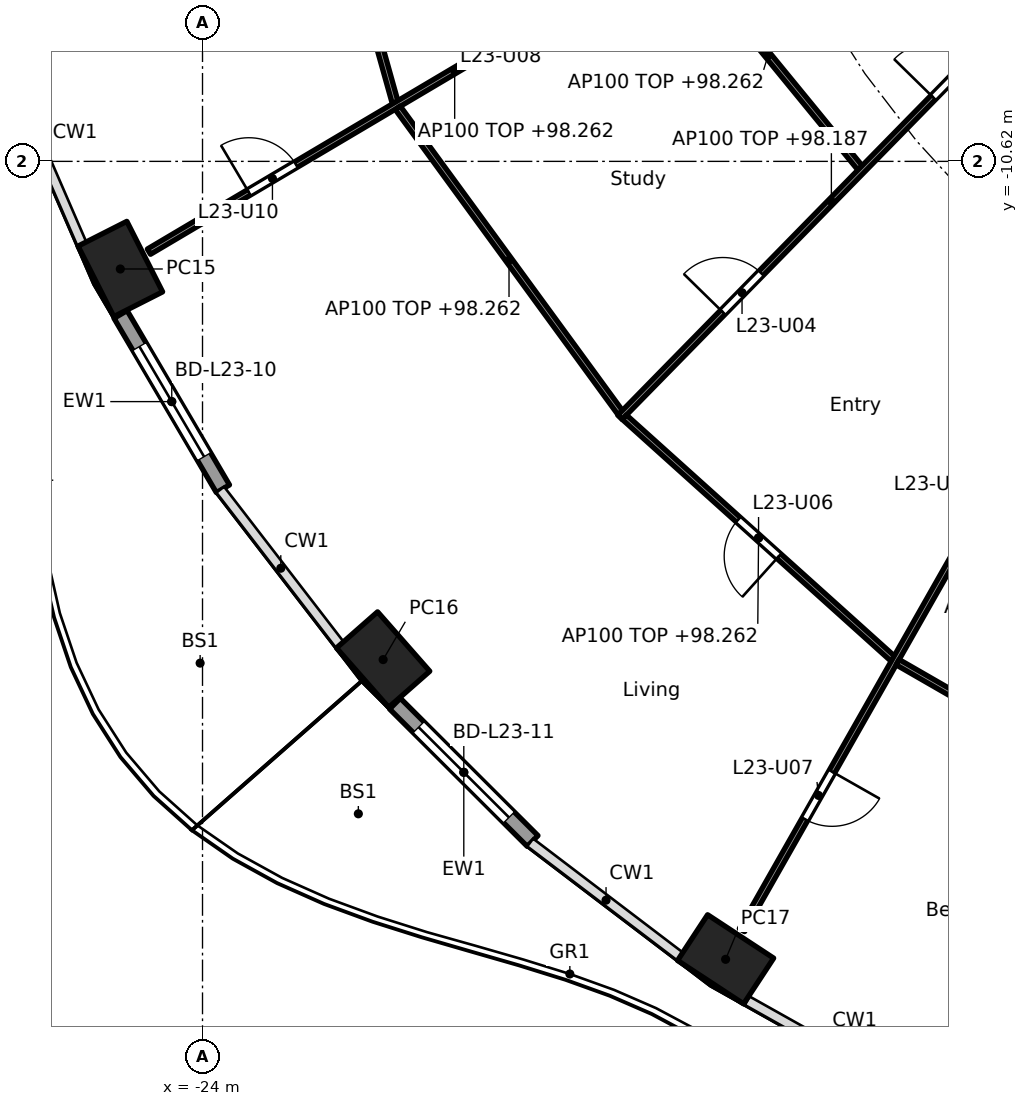
"""IFC4 building model, lengths in metres.
Left out: names, types, materials, properties, quantities, classifications, styles, units other than length and angle.
Written with IfcOpenShell. Run it as: python <this file> out.ifc"""

import sys

from ifc_helpers import new_model, si_unit, direction, frame, frame_2d, origin, origin_2d, place, context, subcontext, project, spatial, rectangle, hollow_rectangle, extrude, element, fill, save


model = new_model("IFC4")
c1 = context("Model", 3, precision=1e-05, world=origin(), true_north=direction((0.0, 1.0)))
c2 = subcontext(c1, "Body", "Model", "MODEL_VIEW")
j1 = project(units=[si_unit("LENGTHUNIT", "METRE"), si_unit("PLANEANGLEUNIT", "RADIAN")], contexts=[c1])
p1 = place(None, origin())
s1 = spatial("IfcSite", under=j1, at=p1, CompositionType="ELEMENT")
p2 = place(p1, origin())
s2 = spatial("IfcBuilding", under=s1, at=p2, CompositionType="ELEMENT")
p3 = place(p2, frame((0.0, 0.0, 95.5)))
s3 = spatial("IfcBuildingStorey", under=s2, at=p3, CompositionType="ELEMENT", Elevation=95.5)
for number, where, z_axis, x_axis in (
    (1, (-25.352, -12.39, 0.0), (0.0, 0.0, 1.0), (0.452, -0.892, 0.0)),
    (2, (-21.03, -18.813, 0.0), (0.0, 0.0, 1.0), (0.66, -0.751, 0.0)),
    (3, (-15.397, -23.742, 0.0), (0.0, 0.0, 1.0), (0.836, -0.549, 0.0)),
):
    element("IfcColumn", number, at=place(p3, frame(where, z_axis=z_axis, x_axis=x_axis)), inside=s3, PredefinedType="COLUMN", context=c2, shape_type="SweptSolid", body=[
        extrude(hollow_rectangle(XDim=1.3, YDim=0.9, WallThickness=0.045, at=origin_2d()), origin(), (0.0, 0.0, 1.0), 3.7),
    ])
p4 = place(p3, frame((-23.664, -16.004, 0.0), z_axis=(0.0, 0.0, 1.0), x_axis=(-0.506352525095, 0.86232657406, 0.0)))
e4 = element("IfcWall", 4, at=p4, inside=s3, PredefinedType="SOLIDWALL", context=c2, shape_type="SweptSolid", body=[
    extrude(rectangle(XDim=3.325, YDim=0.25, at=frame_2d((1.663, 0.0))), origin(), (0.0, 0.0, 1.0), 3.44),
])
p5 = place(p4, frame((0.612, 0.0, 0.0)))
e5 = element("IfcOpeningElement", 5, at=p5, cuts=e4, PredefinedType="OPENING", context=c2, shape_type="SweptSolid", body=[
    extrude(rectangle(XDim=2.1, YDim=2.4, at=frame_2d((1.05, 1.2))), frame((0.0, 0.135, 0.0), z_axis=(0.0, -1.0, 0.0), x_axis=(1.0, 0.0, 0.0)), (0.0, 0.0, 1.0), 0.27),
])
p6 = place(p3, frame((-18.571, -21.796, 0.0), z_axis=(0.0, 0.0, 1.0), x_axis=(-0.707831646613, 0.706381171927, 0.0)))
e6 = element("IfcWall", 6, at=p6, inside=s3, PredefinedType="SOLIDWALL", context=c2, shape_type="SweptSolid", body=[
    extrude(rectangle(XDim=3.198, YDim=0.25, at=frame_2d((1.599, 0.0))), origin(), (0.0, 0.0, 1.0), 3.44),
])
p7 = place(p6, frame((0.549, 0.0, 0.0)))
e7 = element("IfcOpeningElement", 7, at=p7, cuts=e6, PredefinedType="OPENING", context=c2, shape_type="SweptSolid", body=[
    extrude(rectangle(XDim=2.1, YDim=2.4, at=frame_2d((1.05, 1.2))), frame((0.0, 0.135, 0.0), z_axis=(0.0, -1.0, 0.0), x_axis=(1.0, 0.0, 0.0)), (0.0, 0.0, 1.0), 0.27),
])
p8 = place(p3, frame((-12.635, -5.134, 0.0), z_axis=(0.0, 0.0, 1.0), x_axis=(0.707106781187, -0.707106781187, 0.0)))
e8 = element("IfcWall", 8, at=p8, inside=s3, PredefinedType="PARTITIONING", context=c2, shape_type="SweptSolid", body=[
    extrude(rectangle(XDim=10.609, YDim=0.2, at=frame_2d((5.305, 0.0))), origin(), (0.0, 0.0, 1.0), 3.44),
])
p9 = place(p8, frame((4.804, 0.0, 0.0)))
e9 = element("IfcOpeningElement", 9, at=p9, cuts=e8, PredefinedType="OPENING", context=c2, shape_type="SweptSolid", body=[
    extrude(rectangle(XDim=1.0, YDim=2.1, at=frame_2d((0.5, 1.05))), frame((0.0, 0.11, 0.0), z_axis=(0.0, -1.0, 0.0), x_axis=(1.0, 0.0, 0.0)), (0.0, 0.0, 1.0), 0.22),
])
p10 = place(p3, frame((-22.463, -3.832, 0.0), z_axis=(0.0, 0.0, 1.0), x_axis=(0.269797759333, -0.962917010473, 0.0)))
e10 = element("IfcWall", 10, at=p10, inside=s3, PredefinedType="PARTITIONING", context=c2, shape_type="SweptSolid", body=[
    extrude(rectangle(XDim=6.043, YDim=0.1, at=frame_2d((3.021, 0.0))), origin(), (0.0, 0.0, 1.0), 2.762),
])
p11 = place(p3, frame((-14.825, -6.148, 0.0), z_axis=(0.0, 0.0, 1.0), x_axis=(-0.860400431487, -0.509618580408, 0.0)))
e11 = element("IfcWall", 11, at=p11, inside=s3, PredefinedType="PARTITIONING", context=c2, shape_type="SweptSolid", body=[
    extrude(rectangle(XDim=11.688, YDim=0.1, at=frame_2d((5.844, 0.0))), origin(), (0.0, 0.0, 1.0), 2.762),
])
p12 = place(p11, frame((3.858, 0.0, 0.0)))
e12 = element("IfcOpeningElement", 12, at=p12, cuts=e11, PredefinedType="OPENING", context=c2, shape_type="SweptSolid", body=[
    extrude(rectangle(XDim=0.9, YDim=2.1, at=frame_2d((0.45, 1.05))), frame((0.0, 0.06, 0.0), z_axis=(0.0, -1.0, 0.0), x_axis=(1.0, 0.0, 0.0)), (0.0, 0.0, 1.0), 0.12),
])
p13 = place(p11, frame((8.877, 0.0, 0.0)))
e13 = element("IfcOpeningElement", 13, at=p13, cuts=e11, PredefinedType="OPENING", context=c2, shape_type="SweptSolid", body=[
    extrude(rectangle(XDim=0.9, YDim=2.1, at=frame_2d((0.45, 1.05))), frame((0.0, 0.06, 0.0), z_axis=(0.0, -1.0, 0.0), x_axis=(1.0, 0.0, 0.0)), (0.0, 0.0, 1.0), 0.12),
])
p14 = place(p3, frame((-16.214, -7.028, 0.0), z_axis=(0.0, 0.0, 1.0), x_axis=(0.633396341139, -0.773827548639, 0.0)))
e14 = element("IfcWall", 14, at=p14, inside=s3, PredefinedType="PARTITIONING", context=c2, shape_type="SweptSolid", body=[
    extrude(rectangle(XDim=4.779, YDim=0.1, at=frame_2d((2.39, 0.0))), origin(), (0.0, 0.0, 1.0), 2.762),
])
p15 = place(p3, frame((-20.79, -9.739, 0.0), z_axis=(0.0, 0.0, 1.0), x_axis=(0.589611246748, -0.807687178126, 0.0)))
e15 = element("IfcWall", 15, at=p15, inside=s3, PredefinedType="PARTITIONING", context=c2, shape_type="SweptSolid", body=[
    extrude(rectangle(XDim=6.208, YDim=0.1, at=frame_2d((3.104, 0.0))), origin(), (0.0, 0.0, 1.0), 2.762),
])
p16 = place(p3, frame((-10.181, -7.729, 0.0), z_axis=(0.0, 0.0, 1.0), x_axis=(-0.699710752188, -0.714426247609, 0.0)))
e16 = element("IfcWall", 16, at=p16, inside=s3, PredefinedType="PARTITIONING", context=c2, shape_type="SweptSolid", body=[
    extrude(rectangle(XDim=9.938, YDim=0.1, at=frame_2d((4.969, 0.0))), origin(), (0.0, 0.0, 1.0), 2.687),
])
p17 = place(p16, frame((1.675, 0.0, 0.0)))
e17 = element("IfcOpeningElement", 17, at=p17, cuts=e16, PredefinedType="OPENING", context=c2, shape_type="SweptSolid", body=[
    extrude(rectangle(XDim=0.9, YDim=2.1, at=frame_2d((0.45, 1.05))), frame((0.0, 0.06, 0.0), z_axis=(0.0, -1.0, 0.0), x_axis=(1.0, 0.0, 0.0)), (0.0, 0.0, 1.0), 0.12),
])
p18 = place(p16, frame((6.619, 0.0, 0.0)))
e18 = element("IfcOpeningElement", 18, at=p18, cuts=e16, PredefinedType="OPENING", context=c2, shape_type="SweptSolid", body=[
    extrude(rectangle(XDim=0.9, YDim=2.1, at=frame_2d((0.45, 1.05))), frame((0.0, 0.06, 0.0), z_axis=(0.0, -1.0, 0.0), x_axis=(1.0, 0.0, 0.0)), (0.0, 0.0, 1.0), 0.12),
])
p19 = place(p3, frame((-17.063, -14.827, 0.0), z_axis=(0.0, 0.0, 1.0), x_axis=(0.743478142868, -0.668760234373, 0.0)))
e19 = element("IfcWall", 19, at=p19, inside=s3, PredefinedType="PARTITIONING", context=c2, shape_type="SweptSolid", body=[
    extrude(rectangle(XDim=5.937, YDim=0.1, at=frame_2d((2.969, 0.0))), origin(), (0.0, 0.0, 1.0), 2.762),
])
p20 = place(p19, frame((2.519, 0.0, 0.0)))
e20 = element("IfcOpeningElement", 20, at=p20, cuts=e19, PredefinedType="OPENING", context=c2, shape_type="SweptSolid", body=[
    extrude(rectangle(XDim=0.9, YDim=2.1, at=frame_2d((0.45, 1.05))), frame((0.0, 0.06, 0.0), z_axis=(0.0, -1.0, 0.0), x_axis=(1.0, 0.0, 0.0)), (0.0, 0.0, 1.0), 0.12),
])
p21 = place(p3, frame((-7.707, -10.198, 0.0), z_axis=(0.0, 0.0, 1.0), x_axis=(-0.49395524734, -0.869487328042, 0.0)))
e21 = element("IfcWall", 21, at=p21, inside=s3, PredefinedType="PARTITIONING", context=c2, shape_type="SweptSolid", body=[
    extrude(rectangle(XDim=15.025, YDim=0.1, at=frame_2d((7.512, 0.0))), origin(), (0.0, 0.0, 1.0), 2.687),
])
p22 = place(p21, frame((1.684, 0.0, 0.0)))
e22 = element("IfcOpeningElement", 22, at=p22, cuts=e21, PredefinedType="OPENING", context=c2, shape_type="SweptSolid", body=[
    extrude(rectangle(XDim=0.9, YDim=2.1, at=frame_2d((0.45, 1.05))), frame((0.0, 0.06, 0.0), z_axis=(0.0, -1.0, 0.0), x_axis=(1.0, 0.0, 0.0)), (0.0, 0.0, 1.0), 0.12),
])
p23 = place(p21, frame((6.648, 0.0, 0.0)))
e23 = element("IfcOpeningElement", 23, at=p23, cuts=e21, PredefinedType="OPENING", context=c2, shape_type="SweptSolid", body=[
    extrude(rectangle(XDim=0.9, YDim=2.1, at=frame_2d((0.45, 1.05))), frame((0.0, 0.06, 0.0), z_axis=(0.0, -1.0, 0.0), x_axis=(1.0, 0.0, 0.0)), (0.0, 0.0, 1.0), 0.12),
])
p24 = place(p21, frame((12.027, 0.0, 0.0)))
e24 = element("IfcOpeningElement", 24, at=p24, cuts=e21, PredefinedType="OPENING", context=c2, shape_type="SweptSolid", body=[
    extrude(rectangle(XDim=0.9, YDim=2.1, at=frame_2d((0.45, 1.05))), frame((0.0, 0.06, 0.0), z_axis=(0.0, -1.0, 0.0), x_axis=(1.0, 0.0, 0.0)), (0.0, 0.0, 1.0), 0.12),
])
p25 = place(p3, frame((-12.568, -18.856, 0.0), z_axis=(0.0, 0.0, 1.0), x_axis=(0.866533437451, -0.499119025664, 0.0)))
e25 = element("IfcWall", 25, at=p25, inside=s3, PredefinedType="PARTITIONING", context=c2, shape_type="SweptSolid", body=[
    extrude(rectangle(XDim=5.535, YDim=0.1, at=frame_2d((2.768, 0.0))), origin(), (0.0, 0.0, 1.0), 2.762),
])
p26 = place(p25, frame((3.714, 0.0, 0.0)))
e26 = element("IfcOpeningElement", 26, at=p26, cuts=e25, PredefinedType="OPENING", context=c2, shape_type="SweptSolid", body=[
    extrude(rectangle(XDim=0.9, YDim=2.1, at=frame_2d((0.45, 1.05))), frame((0.0, 0.06, 0.0), z_axis=(0.0, -1.0, 0.0), x_axis=(1.0, 0.0, 0.0)), (0.0, 0.0, 1.0), 0.12),
])
p27 = place(p5, origin())
e27 = element("IfcDoor", 27, at=p27, inside=s3, OperationType="SLIDING_TO_LEFT", PredefinedType="DOOR", context=c2, shape_type="SweptSolid", body=[
    extrude(rectangle(XDim=2.1, YDim=2.4, at=frame_2d((1.05, 1.2))), frame((0.0, 0.025, 0.0), z_axis=(0.0, -1.0, 0.0), x_axis=(1.0, 0.0, 0.0)), (0.0, 0.0, 1.0), 0.05),
])
fill(e5, e27)
p28 = place(p7, origin())
e28 = element("IfcDoor", 28, at=p28, inside=s3, OperationType="SLIDING_TO_LEFT", PredefinedType="DOOR", context=c2, shape_type="SweptSolid", body=[
    extrude(rectangle(XDim=2.1, YDim=2.4, at=frame_2d((1.05, 1.2))), frame((0.0, 0.025, 0.0), z_axis=(0.0, -1.0, 0.0), x_axis=(1.0, 0.0, 0.0)), (0.0, 0.0, 1.0), 0.05),
])
fill(e7, e28)
p29 = place(p17, frame((0.9, 0.0, 0.0), x_axis=(-1.0, 0.0, 0.0)))
e29 = element("IfcDoor", 29, at=p29, inside=s3, OperationType="SINGLE_SWING_LEFT", PredefinedType="DOOR", context=c2, shape_type="SweptSolid", body=[
    extrude(rectangle(XDim=0.9, YDim=2.1, at=frame_2d((0.45, 1.05))), frame((0.0, 0.025, 0.0), z_axis=(0.0, -1.0, 0.0), x_axis=(1.0, 0.0, 0.0)), (0.0, 0.0, 1.0), 0.05),
])
fill(e17, e29)
p30 = place(p18, frame((0.9, 0.0, 0.0), x_axis=(-1.0, 0.0, 0.0)))
e30 = element("IfcDoor", 30, at=p30, inside=s3, OperationType="SINGLE_SWING_LEFT", PredefinedType="DOOR", context=c2, shape_type="SweptSolid", body=[
    extrude(rectangle(XDim=0.9, YDim=2.1, at=frame_2d((0.45, 1.05))), frame((0.0, 0.025, 0.0), z_axis=(0.0, -1.0, 0.0), x_axis=(1.0, 0.0, 0.0)), (0.0, 0.0, 1.0), 0.05),
])
fill(e18, e30)
p31 = place(p20, frame((0.9, 0.0, 0.0), x_axis=(-1.0, 0.0, 0.0)))
e31 = element("IfcDoor", 31, at=p31, inside=s3, OperationType="SINGLE_SWING_LEFT", PredefinedType="DOOR", context=c2, shape_type="SweptSolid", body=[
    extrude(rectangle(XDim=0.9, YDim=2.1, at=frame_2d((0.45, 1.05))), frame((0.0, 0.025, 0.0), z_axis=(0.0, -1.0, 0.0), x_axis=(1.0, 0.0, 0.0)), (0.0, 0.0, 1.0), 0.05),
])
fill(e20, e31)
p32 = place(p24, origin())
e32 = element("IfcDoor", 32, at=p32, inside=s3, OperationType="SINGLE_SWING_LEFT", PredefinedType="DOOR", context=c2, shape_type="SweptSolid", body=[
    extrude(rectangle(XDim=0.9, YDim=2.1, at=frame_2d((0.45, 1.05))), frame((0.0, 0.025, 0.0), z_axis=(0.0, -1.0, 0.0), x_axis=(1.0, 0.0, 0.0)), (0.0, 0.0, 1.0), 0.05),
])
fill(e24, e32)
p33 = place(p13, frame((0.9, 0.0, 0.0), x_axis=(-1.0, 0.0, 0.0)))
e33 = element("IfcDoor", 33, at=p33, inside=s3, OperationType="SINGLE_SWING_LEFT", PredefinedType="DOOR", context=c2, shape_type="SweptSolid", body=[
    extrude(rectangle(XDim=0.9, YDim=2.1, at=frame_2d((0.45, 1.05))), frame((0.0, 0.025, 0.0), z_axis=(0.0, -1.0, 0.0), x_axis=(1.0, 0.0, 0.0)), (0.0, 0.0, 1.0), 0.05),
])
fill(e13, e33)
save(model, sys.argv[1])
